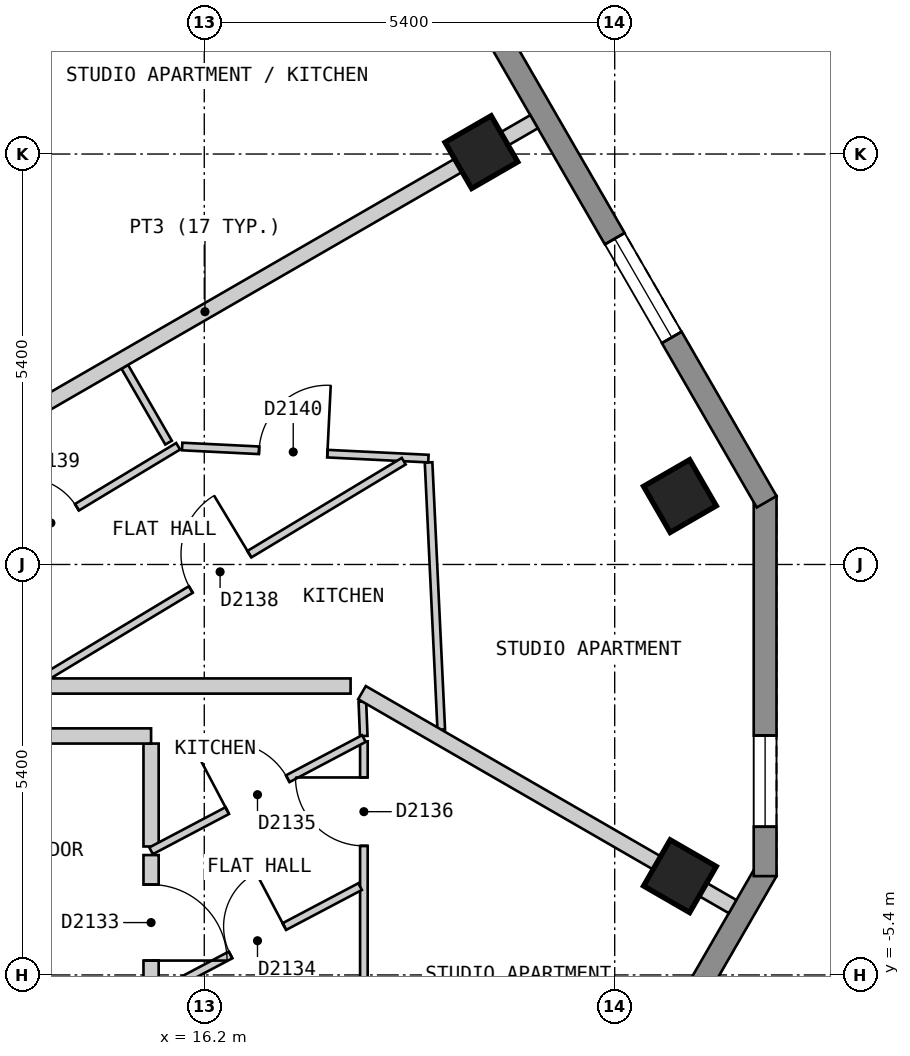
"""IFC4 building model, lengths in metres.
Left out: names, types, materials, properties, quantities, classifications, styles, units other than length and angle.
Written with IfcOpenShell. Run it as: python <this file> out.ifc"""

import sys

from ifc_helpers import new_model, si_unit, direction, frame, frame_2d, origin, origin_2d, place, context, subcontext, project, spatial, polyline, rectangle, outline, extrude, element, fill, save


model = new_model("IFC4")
c1 = context("Model", 3, precision=1e-05, world=origin(), true_north=direction((0.0, 1.0)))
c2 = subcontext(c1, "Body", "Model", "MODEL_VIEW")
j1 = project(units=[si_unit("LENGTHUNIT", "METRE"), si_unit("PLANEANGLEUNIT", "RADIAN")], contexts=[c1])
p1 = place(None, origin())
s1 = spatial("IfcSite", under=j1, at=p1, CompositionType="ELEMENT")
p2 = place(p1, origin())
s2 = spatial("IfcBuilding", under=s1, at=p2, CompositionType="ELEMENT")
p3 = place(p2, frame((0.0, 0.0, 217.8)))
s3 = spatial("IfcBuildingStorey", under=s2, at=p3, CompositionType="ELEMENT", Elevation=217.8)
for number, where, z_axis, x_axis in (
    (1, (22.458, -4.101, 0.0), (0.0, 0.0, 1.0), (0.5, 0.866, 0.0)),
    (2, (22.458, 0.9, 0.0), (0.0, 0.0, 1.0), (-0.5, 0.866, 0.0)),
    (3, (19.846, 5.425, 0.0), (0.0, 0.0, 1.0), (-0.5, 0.866, 0.0)),
):
    element("IfcColumn", number, at=place(p3, frame(where, z_axis=z_axis, x_axis=x_axis)), inside=s3, PredefinedType="COLUMN", context=c2, shape_type="SweptSolid", body=[
        extrude(rectangle(XDim=0.7, YDim=0.7, at=origin_2d()), origin(), (0.0, 0.0, 1.0), 3.0),
    ])
p4 = place(p3, frame((15.285, -18.425, 0.0), z_axis=(0.0, 0.0, 1.0), x_axis=(0.500012653391, 0.866018098222, 0.0)))
e4 = element("IfcWall", 4, at=p4, inside=s3, PredefinedType="SOLIDWALL", context=c2, shape_type="SweptSolid", body=[
    extrude(outline(polyline([(0.0, -0.15), (16.628, -0.15), (16.548, 0.15), (0.08, 0.15), (0.0, -0.15)])), origin(), (0.0, 0.0, 1.0), 2.7),
])
p5 = place(p4, frame((2.444, 0.0, 0.15)))
e5 = element("IfcOpeningElement", 5, at=p5, cuts=e4, PredefinedType="OPENING", context=c2, shape_type="SweptSolid", body=[
    extrude(rectangle(XDim=1.5, YDim=2.1, at=frame_2d((0.75, 1.05))), frame((0.0, 0.16, 0.0), z_axis=(0.0, -1.0, 0.0), x_axis=(1.0, 0.0, 0.0)), (0.0, 0.0, 1.0), 0.32),
])
p6 = place(p4, frame((7.564, 0.0, 0.15)))
e6 = element("IfcOpeningElement", 6, at=p6, cuts=e4, PredefinedType="OPENING", context=c2, shape_type="SweptSolid", body=[
    extrude(rectangle(XDim=1.5, YDim=2.1, at=frame_2d((0.75, 1.05))), frame((0.0, 0.16, 0.0), z_axis=(0.0, -1.0, 0.0), x_axis=(1.0, 0.0, 0.0)), (0.0, 0.0, 1.0), 0.32),
])
p7 = place(p4, frame((12.682, 0.0, 0.15)))
e7 = element("IfcOpeningElement", 7, at=p7, cuts=e4, PredefinedType="OPENING", context=c2, shape_type="SweptSolid", body=[
    extrude(rectangle(XDim=1.5, YDim=2.1, at=frame_2d((0.75, 1.05))), frame((0.0, 0.16, 0.0), z_axis=(0.0, -1.0, 0.0), x_axis=(1.0, 0.0, 0.0)), (0.0, 0.0, 1.0), 0.32),
])
p8 = place(p3, frame((23.579, -4.1, 0.0), z_axis=(0.0, 0.0, 1.0), x_axis=(0.0, 1.0, 0.0)))
e8 = element("IfcWall", 8, at=p8, inside=s3, PredefinedType="SOLIDWALL", context=c2, shape_type="SweptSolid", body=[
    extrude(outline(polyline([(0.0, -0.15), (5.0, -0.15), (4.92, 0.15), (0.08, 0.15), (0.0, -0.15)])), origin(), (0.0, 0.0, 1.0), 2.7),
])
p9 = place(p8, frame((0.65, 0.0, 0.15)))
e9 = element("IfcOpeningElement", 9, at=p9, cuts=e8, PredefinedType="OPENING", context=c2, shape_type="SweptSolid", body=[
    extrude(rectangle(XDim=1.2, YDim=2.1, at=frame_2d((0.6, 1.05))), frame((0.0, 0.16, 0.0), z_axis=(0.0, -1.0, 0.0), x_axis=(1.0, 0.0, 0.0)), (0.0, 0.0, 1.0), 0.32),
])
p10 = place(p3, frame((23.599, 0.825, 0.0), z_axis=(0.0, 0.0, 1.0), x_axis=(-0.500003656944, 0.866023292436, 0.0)))
e10 = element("IfcWall", 10, at=p10, inside=s3, PredefinedType="SOLIDWALL", context=c2, shape_type="SweptSolid", body=[
    extrude(outline(polyline([(0.0, -0.15), (22.17, -0.15), (22.09, 0.15), (0.08, 0.15), (0.0, -0.15)])), origin(), (0.0, 0.0, 1.0), 2.7),
])
p11 = place(p10, frame((2.497, 0.0, 0.15)))
e11 = element("IfcOpeningElement", 11, at=p11, cuts=e10, PredefinedType="OPENING", context=c2, shape_type="SweptSolid", body=[
    extrude(rectangle(XDim=1.5, YDim=2.1, at=frame_2d((0.75, 1.05))), frame((0.0, 0.16, 0.0), z_axis=(0.0, -1.0, 0.0), x_axis=(1.0, 0.0, 0.0)), (0.0, 0.0, 1.0), 0.32),
])
p12 = place(p10, frame((7.723, 0.0, 0.15)))
e12 = element("IfcOpeningElement", 12, at=p12, cuts=e10, PredefinedType="OPENING", context=c2, shape_type="SweptSolid", body=[
    extrude(rectangle(XDim=1.5, YDim=2.1, at=frame_2d((0.75, 1.05))), frame((0.0, 0.16, 0.0), z_axis=(0.0, -1.0, 0.0), x_axis=(1.0, 0.0, 0.0)), (0.0, 0.0, 1.0), 0.32),
])
p13 = place(p10, frame((12.948, 0.0, 0.15)))
e13 = element("IfcOpeningElement", 13, at=p13, cuts=e10, PredefinedType="OPENING", context=c2, shape_type="SweptSolid", body=[
    extrude(rectangle(XDim=1.5, YDim=2.1, at=frame_2d((0.75, 1.05))), frame((0.0, 0.16, 0.0), z_axis=(0.0, -1.0, 0.0), x_axis=(1.0, 0.0, 0.0)), (0.0, 0.0, 1.0), 0.32),
])
p14 = place(p10, frame((18.173, 0.0, 0.15)))
e14 = element("IfcOpeningElement", 14, at=p14, cuts=e10, PredefinedType="OPENING", context=c2, shape_type="SweptSolid", body=[
    extrude(rectangle(XDim=1.5, YDim=2.1, at=frame_2d((0.75, 1.05))), frame((0.0, 0.16, 0.0), z_axis=(0.0, -1.0, 0.0), x_axis=(1.0, 0.0, 0.0)), (0.0, 0.0, 1.0), 0.32),
])
p15 = place(p3, frame((15.5, -2.356, 0.0), z_axis=(0.0, 0.0, 1.0), x_axis=(0.0, -1.0, 0.0)))
e15 = element("IfcWall", 15, at=p15, inside=s3, PredefinedType="PARTITIONING", context=c2, shape_type="SweptSolid", body=[
    extrude(rectangle(XDim=1.354, YDim=0.2, at=frame_2d((0.677, 0.0))), origin(), (0.0, 0.0, 1.0), 2.7),
])
p16 = place(p3, frame((12.902, -2.256, 0.0), z_axis=(0.0, 0.0, 1.0), x_axis=(1.0, 0.0, 0.0)))
e16 = element("IfcWall", 16, at=p16, inside=s3, PredefinedType="PARTITIONING", context=c2, shape_type="SweptSolid", body=[
    extrude(rectangle(XDim=2.598, YDim=0.2, at=frame_2d((1.299, 0.0))), origin(), (0.0, 0.0, 1.0), 2.7),
])
p17 = place(p3, frame((15.5, -5.879, 0.0), z_axis=(0.0, 0.0, 1.0), x_axis=(0.0, 1.0, 0.0)))
e17 = element("IfcWall", 17, at=p17, inside=s3, PredefinedType="PARTITIONING", context=c2, shape_type="SweptSolid", body=[
    extrude(rectangle(XDim=2.056, YDim=0.2, at=frame_2d((1.028, 0.0))), origin(), (0.0, 0.0, 1.0), 2.7),
])
p18 = place(p17, frame((0.668, 0.0, 0.0)))
e18 = element("IfcOpeningElement", 18, at=p18, cuts=e17, PredefinedType="OPENING", context=c2, shape_type="SweptSolid", body=[
    extrude(rectangle(XDim=1.0, YDim=2.1, at=frame_2d((0.5, 1.05))), frame((0.0, 0.11, 0.0), z_axis=(0.0, -1.0, 0.0), x_axis=(1.0, 0.0, 0.0)), (0.0, 0.0, 1.0), 0.22),
])
p19 = place(p3, frame((15.154, 2.601, 0.0), z_axis=(0.0, 0.0, 1.0), x_axis=(0.499808046739, -0.866136199691, 0.0)))
e19 = element("IfcWall", 19, at=p19, inside=s3, PredefinedType="PARTITIONING", context=c2, shape_type="SweptSolid", body=[
    extrude(rectangle(XDim=1.152, YDim=0.1, at=frame_2d((0.576, 0.0))), origin(), (0.0, 0.0, 1.0), 2.7),
])
p20 = place(p3, frame((18.28, -1.804, 0.0), z_axis=(0.0, 0.0, 1.0), x_axis=(0.039839036731, -0.999206110446, 0.0)))
e20 = element("IfcWall", 20, at=p20, inside=s3, PredefinedType="PARTITIONING", context=c2, shape_type="SweptSolid", body=[
    extrude(rectangle(XDim=0.453, YDim=0.1, at=frame_2d((0.227, 0.0))), origin(), (0.0, 0.0, 1.0), 2.7),
])
p21 = place(p3, frame((19.151, 1.343, 0.0), z_axis=(0.0, 0.0, 1.0), x_axis=(0.047509130714, -0.998870803707, 0.0)))
e21 = element("IfcWall", 21, at=p21, inside=s3, PredefinedType="PARTITIONING", context=c2, shape_type="SweptSolid", body=[
    extrude(rectangle(XDim=3.52, YDim=0.1, at=frame_2d((1.76, 0.0))), origin(), (0.0, 0.0, 1.0), 2.7),
])
p22 = place(p3, frame((15.909, 1.552, 0.0), z_axis=(0.0, 0.0, 1.0), x_axis=(0.998799003463, -0.048995414909, 0.0)))
e22 = element("IfcWall", 22, at=p22, inside=s3, PredefinedType="PARTITIONING", context=c2, shape_type="SweptSolid", body=[
    extrude(rectangle(XDim=3.244, YDim=0.1, at=frame_2d((1.622, 0.0))), origin(), (0.0, 0.0, 1.0), 2.7),
])
p23 = place(p22, frame((1.013, 0.0, 0.0)))
e23 = element("IfcOpeningElement", 23, at=p23, cuts=e22, PredefinedType="OPENING", context=c2, shape_type="SweptSolid", body=[
    extrude(rectangle(XDim=0.9, YDim=2.1, at=frame_2d((0.45, 1.05))), frame((0.0, 0.06, 0.0), z_axis=(0.0, -1.0, 0.0), x_axis=(1.0, 0.0, 0.0)), (0.0, 0.0, 1.0), 0.12),
])
p24 = place(p3, frame((18.3, -7.496, 0.0), z_axis=(0.0, 0.0, 1.0), x_axis=(0.0, 1.0, 0.0)))
e24 = element("IfcWall", 24, at=p24, inside=s3, PredefinedType="PARTITIONING", context=c2, shape_type="SweptSolid", body=[
    extrude(rectangle(XDim=5.17, YDim=0.1, at=frame_2d((2.585, 0.0))), origin(), (0.0, 0.0, 1.0), 2.7),
])
p25 = place(p24, frame((3.794, 0.0, 0.0)))
e25 = element("IfcOpeningElement", 25, at=p25, cuts=e24, PredefinedType="OPENING", context=c2, shape_type="SweptSolid", body=[
    extrude(rectangle(XDim=0.9, YDim=2.1, at=frame_2d((0.45, 1.05))), frame((0.0, 0.06, 0.0), z_axis=(0.0, -1.0, 0.0), x_axis=(1.0, 0.0, 0.0)), (0.0, 0.0, 1.0), 0.12),
])
p26 = place(p3, frame((15.5, -3.767, 0.0), z_axis=(0.0, 0.0, 1.0), x_axis=(0.884482889541, 0.466572628976, 0.0)))
e26 = element("IfcWall", 26, at=p26, inside=s3, PredefinedType="PARTITIONING", context=c2, shape_type="SweptSolid", body=[
    extrude(rectangle(XDim=3.166, YDim=0.1, at=frame_2d((1.583, 0.0))), origin(), (0.0, 0.0, 1.0), 2.7),
])
p27 = place(p26, frame((1.133, 0.0, 0.0)))
e27 = element("IfcOpeningElement", 27, at=p27, cuts=e26, PredefinedType="OPENING", context=c2, shape_type="SweptSolid", body=[
    extrude(rectangle(XDim=0.9, YDim=2.1, at=frame_2d((0.45, 1.05))), frame((0.0, 0.06, 0.0), z_axis=(0.0, -1.0, 0.0), x_axis=(1.0, 0.0, 0.0)), (0.0, 0.0, 1.0), 0.12),
])
p28 = place(p3, frame((15.6, -5.636, 0.0), z_axis=(0.0, 0.0, 1.0), x_axis=(0.884468832747, 0.466599275503, 0.0)))
e28 = element("IfcWall", 28, at=p28, inside=s3, PredefinedType="PARTITIONING", context=c2, shape_type="SweptSolid", body=[
    extrude(rectangle(XDim=2.996, YDim=0.1, at=frame_2d((1.498, 0.0))), origin(), (0.0, 0.0, 1.0), 2.7),
])
p29 = place(p28, frame((1.07, 0.0, 0.0)))
e29 = element("IfcOpeningElement", 29, at=p29, cuts=e28, PredefinedType="OPENING", context=c2, shape_type="SweptSolid", body=[
    extrude(rectangle(XDim=0.8, YDim=2.1, at=frame_2d((0.4, 1.05))), frame((0.0, 0.06, 0.0), z_axis=(0.0, -1.0, 0.0), x_axis=(1.0, 0.0, 0.0)), (0.0, 0.0, 1.0), 0.12),
])
p30 = place(p3, frame((12.593, -0.411, 0.0), z_axis=(0.0, 0.0, 1.0), x_axis=(0.856558445359, 0.516050026339, 0.0)))
e30 = element("IfcWall", 30, at=p30, inside=s3, PredefinedType="PARTITIONING", context=c2, shape_type="SweptSolid", body=[
    extrude(rectangle(XDim=3.809, YDim=0.1, at=frame_2d((1.905, 0.0))), origin(), (0.0, 0.0, 1.0), 2.7),
])
p31 = place(p30, frame((1.455, 0.0, 0.0)))
e31 = element("IfcOpeningElement", 31, at=p31, cuts=e30, PredefinedType="OPENING", context=c2, shape_type="SweptSolid", body=[
    extrude(rectangle(XDim=0.8, YDim=2.1, at=frame_2d((0.4, 1.05))), frame((0.0, 0.06, 0.0), z_axis=(0.0, -1.0, 0.0), x_axis=(1.0, 0.0, 0.0)), (0.0, 0.0, 1.0), 0.12),
])
p32 = place(p3, frame((14.081, -1.499, 0.0), z_axis=(0.0, 0.0, 1.0), x_axis=(0.85652273816, 0.516109289798, 0.0)))
e32 = element("IfcWall", 32, at=p32, inside=s3, PredefinedType="PARTITIONING", context=c2, shape_type="SweptSolid", body=[
    extrude(rectangle(XDim=5.537, YDim=0.1, at=frame_2d((2.769, 0.0))), origin(), (0.0, 0.0, 1.0), 2.7),
])
p33 = place(p32, frame((2.267, 0.0, 0.0)))
e33 = element("IfcOpeningElement", 33, at=p33, cuts=e32, PredefinedType="OPENING", context=c2, shape_type="SweptSolid", body=[
    extrude(rectangle(XDim=0.9, YDim=2.1, at=frame_2d((0.45, 1.05))), frame((0.0, 0.06, 0.0), z_axis=(0.0, -1.0, 0.0), x_axis=(1.0, 0.0, 0.0)), (0.0, 0.0, 1.0), 0.12),
])
p34 = place(p3, frame((18.275, -1.686, 0.0), z_axis=(0.0, 0.0, 1.0), x_axis=(0.866041167766, -0.49997269499, 0.0)))
e34 = element("IfcWall", 34, at=p34, inside=s3, PredefinedType="PARTITIONING", context=c2, shape_type="SweptSolid", body=[
    extrude(rectangle(XDim=5.63, YDim=0.2, at=frame_2d((2.815, 0.0))), origin(), (0.0, 0.0, 1.0), 2.7),
])
p35 = place(p3, frame((13.163, -1.599, 0.0), z_axis=(0.0, 0.0, 1.0), x_axis=(1.0, 0.0, 0.0)))
e35 = element("IfcWall", 35, at=p35, inside=s3, PredefinedType="PARTITIONING", context=c2, shape_type="SweptSolid", body=[
    extrude(rectangle(XDim=4.962, YDim=0.2, at=frame_2d((2.481, 0.0))), origin(), (0.0, 0.0, 1.0), 2.7),
])
p36 = place(p3, frame((11.879, 0.826, 0.0), z_axis=(0.0, 0.0, 1.0), x_axis=(0.866065245018, 0.499930986609, 0.0)))
e36 = element("IfcWall", 36, at=p36, inside=s3, PredefinedType="PARTITIONING", context=c2, shape_type="SweptSolid", body=[
    extrude(rectangle(XDim=10.0, YDim=0.2, at=frame_2d((5.0, 0.0))), origin(), (0.0, 0.0, 1.0), 2.7),
])
p37 = place(p3, frame((9.354, 5.401, 0.0), z_axis=(0.0, 0.0, 1.0), x_axis=(0.866018411306, 0.500012111133, 0.0)))
e37 = element("IfcWall", 37, at=p37, inside=s3, PredefinedType="PARTITIONING", context=c2, shape_type="SweptSolid", body=[
    extrude(rectangle(XDim=9.898, YDim=0.2, at=frame_2d((4.949, 0.0))), origin(), (0.0, 0.0, 1.0), 2.7),
])
p38 = place(p9, origin())
e38 = element("IfcWindow", 38, at=p38, inside=s3, PartitioningType="SINGLE_PANEL", PredefinedType="WINDOW", context=c2, shape_type="SweptSolid", body=[
    extrude(rectangle(XDim=1.2, YDim=2.1, at=frame_2d((0.6, 1.05))), frame((0.0, 0.03, 0.0), z_axis=(0.0, -1.0, 0.0), x_axis=(1.0, 0.0, 0.0)), (0.0, 0.0, 1.0), 0.06),
])
fill(e9, e38)
p39 = place(p11, origin())
e39 = element("IfcWindow", 39, at=p39, inside=s3, PartitioningType="SINGLE_PANEL", PredefinedType="WINDOW", context=c2, shape_type="SweptSolid", body=[
    extrude(rectangle(XDim=1.5, YDim=2.1, at=frame_2d((0.75, 1.05))), frame((0.0, 0.03, 0.0), z_axis=(0.0, -1.0, 0.0), x_axis=(1.0, 0.0, 0.0)), (0.0, 0.0, 1.0), 0.06),
])
fill(e11, e39)
p40 = place(p18, origin())
e40 = element("IfcDoor", 40, at=p40, inside=s3, OperationType="SINGLE_SWING_LEFT", PredefinedType="DOOR", context=c2, shape_type="SweptSolid", body=[
    extrude(rectangle(XDim=1.0, YDim=2.1, at=frame_2d((0.5, 1.05))), frame((0.0, 0.025, 0.0), z_axis=(0.0, -1.0, 0.0), x_axis=(1.0, 0.0, 0.0)), (0.0, 0.0, 1.0), 0.05),
])
fill(e18, e40)
p41 = place(p29, origin())
e41 = element("IfcDoor", 41, at=p41, inside=s3, OperationType="SINGLE_SWING_RIGHT", PredefinedType="DOOR", context=c2, shape_type="SweptSolid", body=[
    extrude(rectangle(XDim=0.8, YDim=2.1, at=frame_2d((0.4, 1.05))), frame((0.0, 0.025, 0.0), z_axis=(0.0, -1.0, 0.0), x_axis=(1.0, 0.0, 0.0)), (0.0, 0.0, 1.0), 0.05),
])
fill(e29, e41)
p42 = place(p27, origin())
e42 = element("IfcDoor", 42, at=p42, inside=s3, OperationType="SINGLE_SWING_LEFT", PredefinedType="DOOR", context=c2, shape_type="SweptSolid", body=[
    extrude(rectangle(XDim=0.9, YDim=2.1, at=frame_2d((0.45, 1.05))), frame((0.0, 0.025, 0.0), z_axis=(0.0, -1.0, 0.0), x_axis=(1.0, 0.0, 0.0)), (0.0, 0.0, 1.0), 0.05),
])
fill(e27, e42)
p43 = place(p25, origin())
e43 = element("IfcDoor", 43, at=p43, inside=s3, OperationType="SINGLE_SWING_RIGHT", PredefinedType="DOOR", context=c2, shape_type="SweptSolid", body=[
    extrude(rectangle(XDim=0.9, YDim=2.1, at=frame_2d((0.45, 1.05))), frame((0.0, 0.025, 0.0), z_axis=(0.0, -1.0, 0.0), x_axis=(1.0, 0.0, 0.0)), (0.0, 0.0, 1.0), 0.05),
])
fill(e25, e43)
p44 = place(p33, origin())
e44 = element("IfcDoor", 44, at=p44, inside=s3, OperationType="SINGLE_SWING_RIGHT", PredefinedType="DOOR", context=c2, shape_type="SweptSolid", body=[
    extrude(rectangle(XDim=0.9, YDim=2.1, at=frame_2d((0.45, 1.05))), frame((0.0, 0.025, 0.0), z_axis=(0.0, -1.0, 0.0), x_axis=(1.0, 0.0, 0.0)), (0.0, 0.0, 1.0), 0.05),
])
fill(e33, e44)
p45 = place(p31, origin())
e45 = element("IfcDoor", 45, at=p45, inside=s3, OperationType="SINGLE_SWING_LEFT", PredefinedType="DOOR", context=c2, shape_type="SweptSolid", body=[
    extrude(rectangle(XDim=0.8, YDim=2.1, at=frame_2d((0.4, 1.05))), frame((0.0, 0.025, 0.0), z_axis=(0.0, -1.0, 0.0), x_axis=(1.0, 0.0, 0.0)), (0.0, 0.0, 1.0), 0.05),
])
fill(e31, e45)
p46 = place(p23, origin())
e46 = element("IfcDoor", 46, at=p46, inside=s3, OperationType="SINGLE_SWING_RIGHT", PredefinedType="DOOR", context=c2, shape_type="SweptSolid", body=[
    extrude(rectangle(XDim=0.9, YDim=2.1, at=frame_2d((0.45, 1.05))), frame((0.0, 0.025, 0.0), z_axis=(0.0, -1.0, 0.0), x_axis=(1.0, 0.0, 0.0)), (0.0, 0.0, 1.0), 0.05),
])
fill(e23, e46)
save(model, sys.argv[1])
